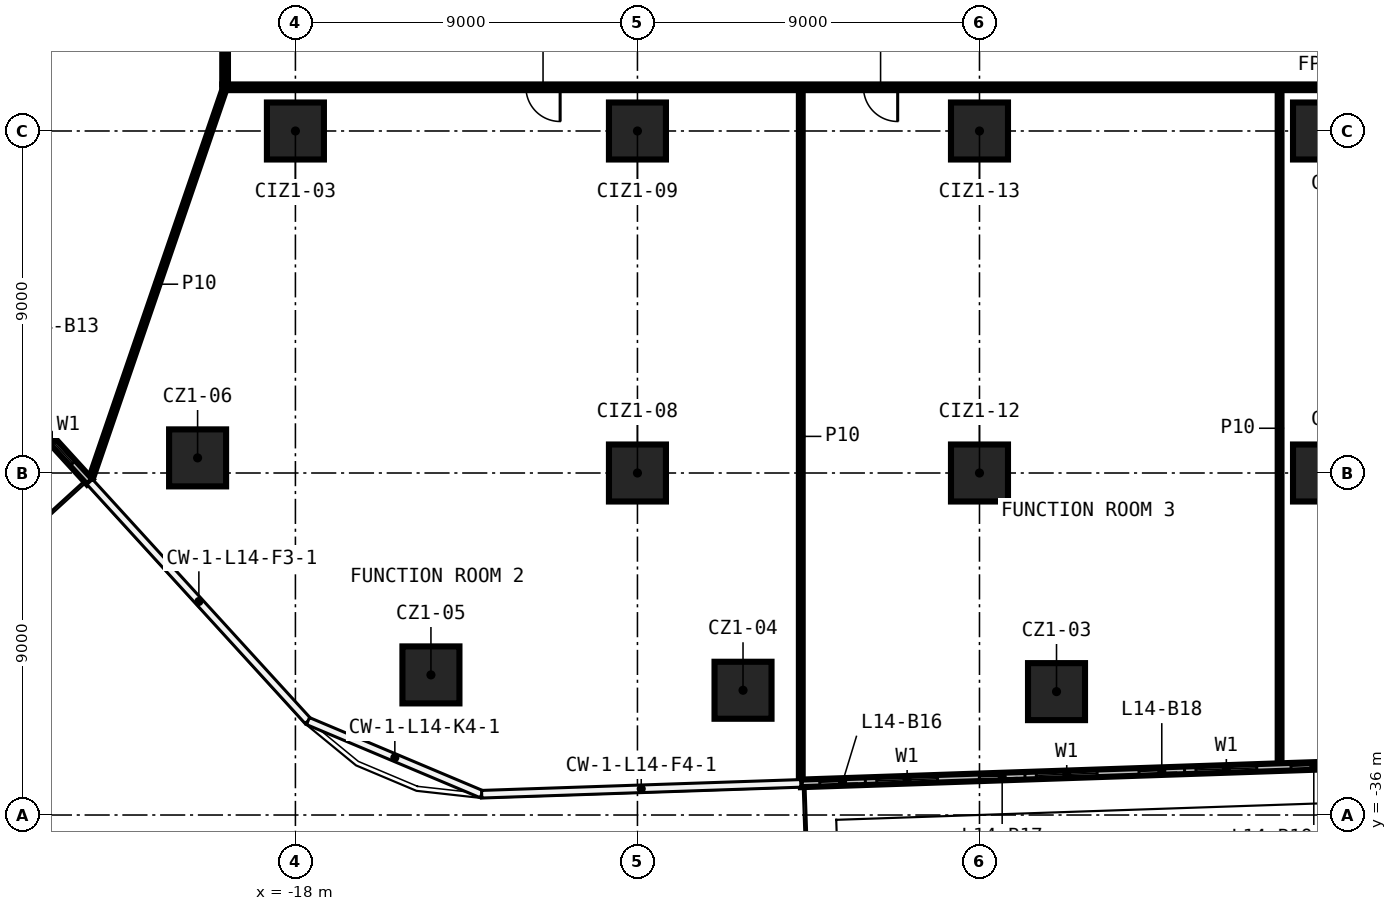
"""IFC4 building model, lengths in metres.
Left out: names, types, materials, properties, quantities, classifications, styles, units other than length and angle.
Written with IfcOpenShell. Run it as: python <this file> out.ifc"""

import sys

from ifc_helpers import new_model, si_unit, direction, frame, frame_2d, origin, origin_2d, place, context, subcontext, project, spatial, rectangle, extrude, element, fill, save


model = new_model("IFC4")
c1 = context("Model", 3, precision=1e-05, world=origin(), true_north=direction((0.0, 1.0)))
c2 = subcontext(c1, "Body", "Model", "MODEL_VIEW")
j1 = project(units=[si_unit("LENGTHUNIT", "METRE"), si_unit("PLANEANGLEUNIT", "RADIAN")], contexts=[c1])
p1 = place(None, origin())
s1 = spatial("IfcSite", under=j1, at=p1, CompositionType="ELEMENT")
p2 = place(p1, origin())
s2 = spatial("IfcBuilding", under=s1, at=p2, CompositionType="ELEMENT")
p3 = place(p2, frame((0.0, 0.0, 73.6)))
s3 = spatial("IfcBuildingStorey", under=s2, at=p3, CompositionType="ELEMENT", Elevation=73.6)
for number, where, z_axis, x_axis in (
    (1, (2.027, -32.753, 0.0), (0.0, 0.0, 1.0), (1.0, 0.0, 0.0)),
    (2, (-6.222, -32.717, 0.0), (0.0, 0.0, 1.0), (1.0, 0.0, 0.0)),
    (3, (-14.434, -32.313, 0.0), (0.0, 0.0, 1.0), (1.0, 0.0, 0.0)),
    (4, (-20.574, -26.602, 0.0), (0.0, 0.0, 1.0), (1.0, 0.0, 0.0)),
    (5, (-18.0, -18.0, 0.0), (0.0, 0.0, 1.0), (1.0, 0.0, 0.0)),
    (6, (-9.0, -27.0, 0.0), (0.0, 0.0, 1.0), (1.0, 0.0, 0.0)),
    (7, (-9.0, -18.0, 0.0), (0.0, 0.0, 1.0), (1.0, 0.0, 0.0)),
    (8, (0.0, -27.0, 0.0), (0.0, 0.0, 1.0), (1.0, 0.0, 0.0)),
    (9, (0.0, -18.0, 0.0), (0.0, 0.0, 1.0), (1.0, 0.0, 0.0)),
    (10, (9.0, -27.0, 0.0), (0.0, 0.0, 1.0), (1.0, 0.0, 0.0)),
    (11, (9.0, -18.0, 0.0), (0.0, 0.0, 1.0), (1.0, 0.0, 0.0)),
):
    element("IfcColumn", number, at=place(p3, frame(where, z_axis=z_axis, x_axis=x_axis)), inside=s3, PredefinedType="COLUMN", context=c2, shape_type="SweptSolid", body=[
        extrude(rectangle(XDim=1.5, YDim=1.5, at=origin_2d()), origin(), (0.0, 0.0, 1.0), 3.3),
    ])
p4 = place(p3, frame((19.925, -16.85, 0.0), z_axis=(0.0, 0.0, 1.0), x_axis=(-1.0, 0.0, 0.0)))
e12 = element("IfcWall", 12, at=p4, inside=s3, PredefinedType="PARTITIONING", context=c2, shape_type="SweptSolid", body=[
    extrude(rectangle(XDim=39.85, YDim=0.15, at=frame_2d((19.925, 0.0))), origin(), (0.0, 0.0, 1.0), 3.3),
])
p5 = place(p4, frame((30.959, 0.0, 0.0)))
e13 = element("IfcOpeningElement", 13, at=p5, cuts=e12, PredefinedType="OPENING", context=c2, shape_type="SweptSolid", body=[
    extrude(rectangle(XDim=0.9, YDim=2.1, at=frame_2d((0.45, 1.05))), frame((0.0, 0.085, 0.0), z_axis=(0.0, -1.0, 0.0), x_axis=(1.0, 0.0, 0.0)), (0.0, 0.0, 1.0), 0.17),
])
p6 = place(p4, frame((22.077, 0.0, 0.0)))
e14 = element("IfcOpeningElement", 14, at=p6, cuts=e12, PredefinedType="OPENING", context=c2, shape_type="SweptSolid", body=[
    extrude(rectangle(XDim=0.9, YDim=2.1, at=frame_2d((0.45, 1.05))), frame((0.0, 0.085, 0.0), z_axis=(0.0, -1.0, 0.0), x_axis=(1.0, 0.0, 0.0)), (0.0, 0.0, 1.0), 0.17),
])
p7 = place(p3, frame((-23.404, -27.213, 0.0), z_axis=(0.0, 0.0, 1.0), x_axis=(0.32441263541, 0.945915663253, 0.0)))
e15 = element("IfcWall", 15, at=p7, inside=s3, PredefinedType="PARTITIONING", context=c2, shape_type="SweptSolid", body=[
    extrude(rectangle(XDim=10.955, YDim=0.1, at=frame_2d((5.478, 0.0))), origin(), (0.0, 0.0, 1.0), 3.3),
])
p8 = place(p3, frame((7.897, -34.72, 0.0), z_axis=(0.0, 0.0, 1.0), x_axis=(0.0, 1.0, 0.0)))
e16 = element("IfcWall", 16, at=p8, inside=s3, PredefinedType="PARTITIONING", context=c2, shape_type="SweptSolid", body=[
    extrude(rectangle(XDim=17.795, YDim=0.1, at=frame_2d((8.897, 0.0))), origin(), (0.0, 0.0, 1.0), 3.3),
])
p9 = place(p3, frame((-4.702, -35.148, 0.0), z_axis=(0.0, 0.0, 1.0), x_axis=(0.0, 1.0, 0.0)))
e17 = element("IfcWall", 17, at=p9, inside=s3, PredefinedType="PARTITIONING", context=c2, shape_type="SweptSolid", body=[
    extrude(rectangle(XDim=18.223, YDim=0.1, at=frame_2d((9.111, 0.0))), origin(), (0.0, 0.0, 1.0), 3.3),
])
p10 = place(p3, frame((-19.85, -16.775, 0.0), z_axis=(0.0, 0.0, 1.0), x_axis=(0.0, 1.0, 0.0)))
e18 = element("IfcWall", 18, at=p10, inside=s3, PredefinedType="PARTITIONING", context=c2, shape_type="SweptSolid", body=[
    extrude(rectangle(XDim=33.55, YDim=0.15, at=frame_2d((16.775, 0.0))), origin(), (0.0, 0.0, 1.0), 3.3),
])
p11 = place(p10, frame((10.123, 0.0, 0.0)))
e19 = element("IfcOpeningElement", 19, at=p11, cuts=e18, PredefinedType="OPENING", context=c2, shape_type="SweptSolid", body=[
    extrude(rectangle(XDim=1.0, YDim=2.1, at=frame_2d((0.5, 1.05))), frame((0.0, 0.085, 0.0), z_axis=(0.0, -1.0, 0.0), x_axis=(1.0, 0.0, 0.0)), (0.0, 0.0, 1.0), 0.17),
])
p12 = place(p10, frame((4.179, 0.0, 0.0)))
e20 = element("IfcOpeningElement", 20, at=p12, cuts=e18, PredefinedType="OPENING", context=c2, shape_type="SweptSolid", body=[
    extrude(rectangle(XDim=0.9, YDim=2.1, at=frame_2d((0.45, 1.05))), frame((0.0, 0.085, 0.0), z_axis=(0.0, -1.0, 0.0), x_axis=(1.0, 0.0, 0.0)), (0.0, 0.0, 1.0), 0.17),
])
p13 = place(p10, frame((27.651, 0.0, 0.0)))
e21 = element("IfcOpeningElement", 21, at=p13, cuts=e18, PredefinedType="OPENING", context=c2, shape_type="SweptSolid", body=[
    extrude(rectangle(XDim=1.0, YDim=2.1, at=frame_2d((0.5, 1.05))), frame((0.0, 0.085, 0.0), z_axis=(0.0, -1.0, 0.0), x_axis=(1.0, 0.0, 0.0)), (0.0, 0.0, 1.0), 0.17),
])
p14 = place(p10, frame((20.601, 0.0, 0.0)))
e22 = element("IfcOpeningElement", 22, at=p14, cuts=e18, PredefinedType="OPENING", context=c2, shape_type="SweptSolid", body=[
    extrude(rectangle(XDim=1.0, YDim=2.1, at=frame_2d((0.5, 1.05))), frame((0.0, 0.085, 0.0), z_axis=(0.0, -1.0, 0.0), x_axis=(1.0, 0.0, 0.0)), (0.0, 0.0, 1.0), 0.17),
])
p15 = place(p3, frame((-34.906, -14.636, 0.0), z_axis=(0.0, 0.0, 1.0), x_axis=(0.674011334321, -0.738721003632, 0.0)))
e23 = element("IfcWall", 23, at=p15, inside=s3, PredefinedType="SOLIDWALL", context=c2, shape_type="SweptSolid", body=[
    extrude(rectangle(XDim=17.053, YDim=0.2, at=frame_2d((8.527, 0.0))), origin(), (0.0, 0.0, 1.0), 3.3),
])
p16 = place(p15, frame((0.5, 0.0, 0.6)))
e24 = element("IfcOpeningElement", 24, at=p16, cuts=e23, PredefinedType="OPENING", context=c2, shape_type="SweptSolid", body=[
    extrude(rectangle(XDim=1.6, YDim=2.4, at=frame_2d((0.8, 1.2))), frame((0.0, 0.11, 0.0), z_axis=(0.0, -1.0, 0.0), x_axis=(1.0, 0.0, 0.0)), (0.0, 0.0, 1.0), 0.22),
])
p17 = place(p15, frame((2.4, 0.0, 0.0)))
e25 = element("IfcOpeningElement", 25, at=p17, cuts=e23, PredefinedType="OPENING", context=c2, shape_type="SweptSolid", body=[
    extrude(rectangle(XDim=1.2, YDim=2.4, at=frame_2d((0.6, 1.2))), frame((0.0, 0.11, 0.0), z_axis=(0.0, -1.0, 0.0), x_axis=(1.0, 0.0, 0.0)), (0.0, 0.0, 1.0), 0.22),
])
p18 = place(p15, frame((6.263, 0.0, 0.6)))
e26 = element("IfcOpeningElement", 26, at=p18, cuts=e23, PredefinedType="OPENING", context=c2, shape_type="SweptSolid", body=[
    extrude(rectangle(XDim=1.6, YDim=2.4, at=frame_2d((0.8, 1.2))), frame((0.0, 0.11, 0.0), z_axis=(0.0, -1.0, 0.0), x_axis=(1.0, 0.0, 0.0)), (0.0, 0.0, 1.0), 0.22),
])
p19 = place(p15, frame((4.763, 0.0, 0.0)))
e27 = element("IfcOpeningElement", 27, at=p19, cuts=e23, PredefinedType="OPENING", context=c2, shape_type="SweptSolid", body=[
    extrude(rectangle(XDim=1.2, YDim=2.4, at=frame_2d((0.6, 1.2))), frame((0.0, 0.11, 0.0), z_axis=(0.0, -1.0, 0.0), x_axis=(1.0, 0.0, 0.0)), (0.0, 0.0, 1.0), 0.22),
])
p20 = place(p15, frame((9.027, 0.0, 0.6)))
e28 = element("IfcOpeningElement", 28, at=p20, cuts=e23, PredefinedType="OPENING", context=c2, shape_type="SweptSolid", body=[
    extrude(rectangle(XDim=1.6, YDim=2.4, at=frame_2d((0.8, 1.2))), frame((0.0, 0.11, 0.0), z_axis=(0.0, -1.0, 0.0), x_axis=(1.0, 0.0, 0.0)), (0.0, 0.0, 1.0), 0.22),
])
p21 = place(p15, frame((10.927, 0.0, 0.0)))
e29 = element("IfcOpeningElement", 29, at=p21, cuts=e23, PredefinedType="OPENING", context=c2, shape_type="SweptSolid", body=[
    extrude(rectangle(XDim=1.2, YDim=2.4, at=frame_2d((0.6, 1.2))), frame((0.0, 0.11, 0.0), z_axis=(0.0, -1.0, 0.0), x_axis=(1.0, 0.0, 0.0)), (0.0, 0.0, 1.0), 0.22),
])
p22 = place(p15, frame((14.79, 0.0, 0.6)))
e30 = element("IfcOpeningElement", 30, at=p22, cuts=e23, PredefinedType="OPENING", context=c2, shape_type="SweptSolid", body=[
    extrude(rectangle(XDim=1.6, YDim=2.4, at=frame_2d((0.8, 1.2))), frame((0.0, 0.11, 0.0), z_axis=(0.0, -1.0, 0.0), x_axis=(1.0, 0.0, 0.0)), (0.0, 0.0, 1.0), 0.22),
])
p23 = place(p15, frame((13.29, 0.0, 0.0)))
e31 = element("IfcOpeningElement", 31, at=p23, cuts=e23, PredefinedType="OPENING", context=c2, shape_type="SweptSolid", body=[
    extrude(rectangle(XDim=1.2, YDim=2.4, at=frame_2d((0.6, 1.2))), frame((0.0, 0.11, 0.0), z_axis=(0.0, -1.0, 0.0), x_axis=(1.0, 0.0, 0.0)), (0.0, 0.0, 1.0), 0.22),
])
p24 = place(p3, frame((-4.702, -35.168, 0.0), z_axis=(0.0, 0.0, 1.0), x_axis=(0.999424265527, 0.033928416948, 0.0)))
e32 = element("IfcWall", 32, at=p24, inside=s3, PredefinedType="SOLIDWALL", context=c2, shape_type="SweptSolid", body=[
    extrude(rectangle(XDim=21.012, YDim=0.2, at=frame_2d((10.506, 0.0))), origin(), (0.0, 0.0, 1.0), 3.3),
])
p25 = place(p24, frame((2.0, 0.0, 0.6)))
e33 = element("IfcOpeningElement", 33, at=p25, cuts=e32, PredefinedType="OPENING", context=c2, shape_type="SweptSolid", body=[
    extrude(rectangle(XDim=1.6, YDim=2.4, at=frame_2d((0.8, 1.2))), frame((0.0, 0.11, 0.0), z_axis=(0.0, -1.0, 0.0), x_axis=(1.0, 0.0, 0.0)), (0.0, 0.0, 1.0), 0.22),
])
p26 = place(p24, frame((0.5, 0.0, 0.0)))
e34 = element("IfcOpeningElement", 34, at=p26, cuts=e32, PredefinedType="OPENING", context=c2, shape_type="SweptSolid", body=[
    extrude(rectangle(XDim=1.2, YDim=2.4, at=frame_2d((0.6, 1.2))), frame((0.0, 0.11, 0.0), z_axis=(0.0, -1.0, 0.0), x_axis=(1.0, 0.0, 0.0)), (0.0, 0.0, 1.0), 0.22),
])
p27 = place(p24, frame((6.202, 0.0, 0.6)))
e35 = element("IfcOpeningElement", 35, at=p27, cuts=e32, PredefinedType="OPENING", context=c2, shape_type="SweptSolid", body=[
    extrude(rectangle(XDim=1.6, YDim=2.4, at=frame_2d((0.8, 1.2))), frame((0.0, 0.11, 0.0), z_axis=(0.0, -1.0, 0.0), x_axis=(1.0, 0.0, 0.0)), (0.0, 0.0, 1.0), 0.22),
])
p28 = place(p24, frame((4.702, 0.0, 0.0)))
e36 = element("IfcOpeningElement", 36, at=p28, cuts=e32, PredefinedType="OPENING", context=c2, shape_type="SweptSolid", body=[
    extrude(rectangle(XDim=1.2, YDim=2.4, at=frame_2d((0.6, 1.2))), frame((0.0, 0.11, 0.0), z_axis=(0.0, -1.0, 0.0), x_axis=(1.0, 0.0, 0.0)), (0.0, 0.0, 1.0), 0.22),
])
p29 = place(p24, frame((10.405, 0.0, 0.6)))
e37 = element("IfcOpeningElement", 37, at=p29, cuts=e32, PredefinedType="OPENING", context=c2, shape_type="SweptSolid", body=[
    extrude(rectangle(XDim=1.6, YDim=2.4, at=frame_2d((0.8, 1.2))), frame((0.0, 0.11, 0.0), z_axis=(0.0, -1.0, 0.0), x_axis=(1.0, 0.0, 0.0)), (0.0, 0.0, 1.0), 0.22),
])
p30 = place(p24, frame((8.905, 0.0, 0.0)))
e38 = element("IfcOpeningElement", 38, at=p30, cuts=e32, PredefinedType="OPENING", context=c2, shape_type="SweptSolid", body=[
    extrude(rectangle(XDim=1.2, YDim=2.4, at=frame_2d((0.6, 1.2))), frame((0.0, 0.11, 0.0), z_axis=(0.0, -1.0, 0.0), x_axis=(1.0, 0.0, 0.0)), (0.0, 0.0, 1.0), 0.22),
])
p31 = place(p24, frame((14.607, 0.0, 0.6)))
e39 = element("IfcOpeningElement", 39, at=p31, cuts=e32, PredefinedType="OPENING", context=c2, shape_type="SweptSolid", body=[
    extrude(rectangle(XDim=1.6, YDim=2.4, at=frame_2d((0.8, 1.2))), frame((0.0, 0.11, 0.0), z_axis=(0.0, -1.0, 0.0), x_axis=(1.0, 0.0, 0.0)), (0.0, 0.0, 1.0), 0.22),
])
p32 = place(p24, frame((12.907, 0.0, 0.0)))
e40 = element("IfcOpeningElement", 40, at=p32, cuts=e32, PredefinedType="OPENING", context=c2, shape_type="SweptSolid", body=[
    extrude(rectangle(XDim=1.2, YDim=2.4, at=frame_2d((0.6, 1.2))), frame((0.0, 0.11, 0.0), z_axis=(0.0, -1.0, 0.0), x_axis=(1.0, 0.0, 0.0)), (0.0, 0.0, 1.0), 0.22),
])
p33 = place(p24, frame((18.809, 0.0, 0.6)))
e41 = element("IfcOpeningElement", 41, at=p33, cuts=e32, PredefinedType="OPENING", context=c2, shape_type="SweptSolid", body=[
    extrude(rectangle(XDim=1.6, YDim=2.4, at=frame_2d((0.8, 1.2))), frame((0.0, 0.11, 0.0), z_axis=(0.0, -1.0, 0.0), x_axis=(1.0, 0.0, 0.0)), (0.0, 0.0, 1.0), 0.22),
])
p34 = place(p24, frame((17.309, 0.0, 0.0)))
e42 = element("IfcOpeningElement", 42, at=p34, cuts=e32, PredefinedType="OPENING", context=c2, shape_type="SweptSolid", body=[
    extrude(rectangle(XDim=1.2, YDim=2.4, at=frame_2d((0.6, 1.2))), frame((0.0, 0.11, 0.0), z_axis=(0.0, -1.0, 0.0), x_axis=(1.0, 0.0, 0.0)), (0.0, 0.0, 1.0), 0.22),
])
p35 = place(p5, origin())
e43 = element("IfcDoor", 43, at=p35, inside=s3, OperationType="SINGLE_SWING_RIGHT", PredefinedType="DOOR", context=c2, shape_type="SweptSolid", body=[
    extrude(rectangle(XDim=0.9, YDim=2.1, at=frame_2d((0.45, 1.05))), frame((0.0, 0.025, 0.0), z_axis=(0.0, -1.0, 0.0), x_axis=(1.0, 0.0, 0.0)), (0.0, 0.0, 1.0), 0.05),
])
fill(e13, e43)
p36 = place(p6, origin())
e44 = element("IfcDoor", 44, at=p36, inside=s3, OperationType="SINGLE_SWING_LEFT", PredefinedType="DOOR", context=c2, shape_type="SweptSolid", body=[
    extrude(rectangle(XDim=0.9, YDim=2.1, at=frame_2d((0.45, 1.05))), frame((0.0, 0.025, 0.0), z_axis=(0.0, -1.0, 0.0), x_axis=(1.0, 0.0, 0.0)), (0.0, 0.0, 1.0), 0.05),
])
fill(e14, e44)
p37 = place(p22, origin())
e45 = element("IfcWindow", 45, at=p37, inside=s3, PartitioningType="SINGLE_PANEL", PredefinedType="WINDOW", context=c2, shape_type="SweptSolid", body=[
    extrude(rectangle(XDim=1.6, YDim=2.4, at=frame_2d((0.8, 1.2))), frame((0.0, 0.03, 0.0), z_axis=(0.0, -1.0, 0.0), x_axis=(1.0, 0.0, 0.0)), (0.0, 0.0, 1.0), 0.06),
])
fill(e30, e45)
p38 = place(p25, origin())
e46 = element("IfcWindow", 46, at=p38, inside=s3, PartitioningType="SINGLE_PANEL", PredefinedType="WINDOW", context=c2, shape_type="SweptSolid", body=[
    extrude(rectangle(XDim=1.6, YDim=2.4, at=frame_2d((0.8, 1.2))), frame((0.0, 0.03, 0.0), z_axis=(0.0, -1.0, 0.0), x_axis=(1.0, 0.0, 0.0)), (0.0, 0.0, 1.0), 0.06),
])
fill(e33, e46)
p39 = place(p26, origin())
e47 = element("IfcDoor", 47, at=p39, inside=s3, OperationType="SLIDING_TO_LEFT", PredefinedType="DOOR", context=c2, shape_type="SweptSolid", body=[
    extrude(rectangle(XDim=1.2, YDim=2.4, at=frame_2d((0.6, 1.2))), frame((0.0, 0.025, 0.0), z_axis=(0.0, -1.0, 0.0), x_axis=(1.0, 0.0, 0.0)), (0.0, 0.0, 1.0), 0.05),
])
fill(e34, e47)
p40 = place(p27, origin())
e48 = element("IfcWindow", 48, at=p40, inside=s3, PartitioningType="SINGLE_PANEL", PredefinedType="WINDOW", context=c2, shape_type="SweptSolid", body=[
    extrude(rectangle(XDim=1.6, YDim=2.4, at=frame_2d((0.8, 1.2))), frame((0.0, 0.03, 0.0), z_axis=(0.0, -1.0, 0.0), x_axis=(1.0, 0.0, 0.0)), (0.0, 0.0, 1.0), 0.06),
])
fill(e35, e48)
p41 = place(p28, origin())
e49 = element("IfcDoor", 49, at=p41, inside=s3, OperationType="SLIDING_TO_LEFT", PredefinedType="DOOR", context=c2, shape_type="SweptSolid", body=[
    extrude(rectangle(XDim=1.2, YDim=2.4, at=frame_2d((0.6, 1.2))), frame((0.0, 0.025, 0.0), z_axis=(0.0, -1.0, 0.0), x_axis=(1.0, 0.0, 0.0)), (0.0, 0.0, 1.0), 0.05),
])
fill(e36, e49)
p42 = place(p29, origin())
e50 = element("IfcWindow", 50, at=p42, inside=s3, PartitioningType="SINGLE_PANEL", PredefinedType="WINDOW", context=c2, shape_type="SweptSolid", body=[
    extrude(rectangle(XDim=1.6, YDim=2.4, at=frame_2d((0.8, 1.2))), frame((0.0, 0.03, 0.0), z_axis=(0.0, -1.0, 0.0), x_axis=(1.0, 0.0, 0.0)), (0.0, 0.0, 1.0), 0.06),
])
fill(e37, e50)
p43 = place(p30, origin())
e51 = element("IfcDoor", 51, at=p43, inside=s3, OperationType="SLIDING_TO_LEFT", PredefinedType="DOOR", context=c2, shape_type="SweptSolid", body=[
    extrude(rectangle(XDim=1.2, YDim=2.4, at=frame_2d((0.6, 1.2))), frame((0.0, 0.025, 0.0), z_axis=(0.0, -1.0, 0.0), x_axis=(1.0, 0.0, 0.0)), (0.0, 0.0, 1.0), 0.05),
])
fill(e38, e51)
p44 = place(p32, origin())
e52 = element("IfcDoor", 52, at=p44, inside=s3, OperationType="SLIDING_TO_LEFT", PredefinedType="DOOR", context=c2, shape_type="SweptSolid", body=[
    extrude(rectangle(XDim=1.2, YDim=2.4, at=frame_2d((0.6, 1.2))), frame((0.0, 0.025, 0.0), z_axis=(0.0, -1.0, 0.0), x_axis=(1.0, 0.0, 0.0)), (0.0, 0.0, 1.0), 0.05),
])
fill(e40, e52)
save(model, sys.argv[1])
